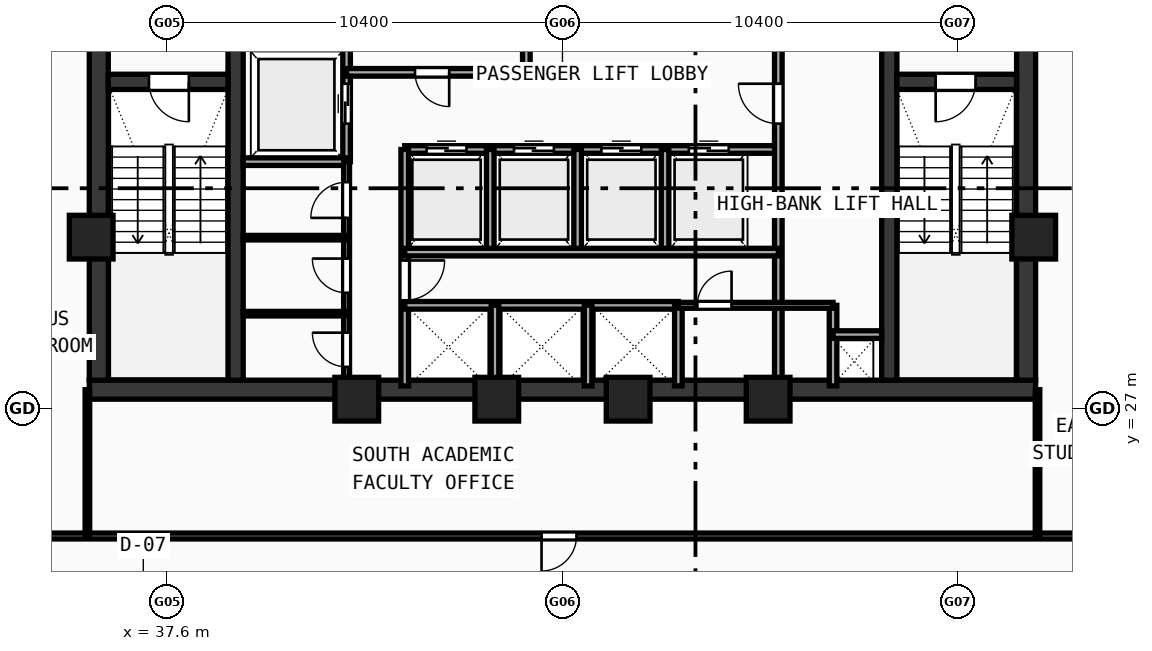
"""IFC4 building model, lengths in metres.
Left out: names, types, materials, properties, quantities, classifications, styles, units other than length and angle.
Written with IfcOpenShell. Run it as: python <this file> out.ifc"""

import sys

from ifc_helpers import new_model, si_unit, direction, frame, frame_2d, origin, origin_with_axes, origin_2d, place, context, subcontext, project, spatial, rectangle, hollow_rectangle, extrude, source, transform, mapped, element, fill, save


model = new_model("IFC4")
c1 = context("Model", 3, precision=1e-05, world=origin(), true_north=direction((0.0, 1.0)))
c2 = subcontext(c1, "Body", "Model", "MODEL_VIEW")
j1 = project(units=[si_unit("LENGTHUNIT", "METRE"), si_unit("PLANEANGLEUNIT", "RADIAN")], contexts=[c1])
p1 = place(None, origin())
s1 = spatial("IfcSite", under=j1, at=p1, CompositionType="ELEMENT")
p2 = place(p1, origin())
s2 = spatial("IfcBuilding", under=s1, at=p2, CompositionType="ELEMENT")
p3 = place(p2, frame((0.0, 0.0, 196.16)))
s3 = spatial("IfcBuildingStorey", under=s2, at=p3, CompositionType="ELEMENT", Elevation=196.16)
p4 = place(p3, frame((35.55, 27.5, 0.0), z_axis=(0.0, 0.0, 1.0), x_axis=(1.0, 0.0, 0.0)))
e1 = element("IfcWall", 1, at=p4, inside=s3, PredefinedType="SHEAR", context=c2, shape_type="SweptSolid", body=[
    extrude(rectangle(XDim=24.9, YDim=0.5, at=frame_2d((12.45, 0.0))), origin(), (0.0, 0.0, 1.0), 3.54),
])
for number, where, z_axis, x_axis in (
    (2, (35.8, 27.75, 0.0), (0.0, 0.0, 1.0), (0.0, 1.0, 0.0)),
    (3, (60.2, 27.75, 0.0), (0.0, 0.0, 1.0), (0.0, 1.0, 0.0)),
):
    element("IfcWall", number, at=place(p3, frame(where, z_axis=z_axis, x_axis=x_axis)), inside=s3, PredefinedType="SHEAR", context=c2, shape_type="SweptSolid", body=[
        extrude(rectangle(XDim=12.2, YDim=0.5, at=frame_2d((6.1, 0.0))), origin(), (0.0, 0.0, 1.0), 3.54),
    ])
p5 = place(p3, frame((39.4, 27.75, 0.0), z_axis=(0.0, 0.0, 1.0), x_axis=(0.0, 1.0, 0.0)))
e4 = element("IfcWall", 4, at=p5, inside=s3, PredefinedType="SHEAR", context=c2, shape_type="SweptSolid", body=[
    extrude(rectangle(XDim=12.2, YDim=0.4, at=frame_2d((6.1, 0.0))), origin(), (0.0, 0.0, 1.0), 3.54),
])
p6 = place(p5, frame((10.0, 0.0, 0.0)))
e5 = element("IfcOpeningElement", 5, at=p6, cuts=e4, PredefinedType="OPENING", context=c2, shape_type="SweptSolid", body=[
    extrude(rectangle(XDim=1.1, YDim=2.1, at=frame_2d((0.55, 1.05))), frame((0.0, 0.21, 0.0), z_axis=(0.0, -1.0, 0.0), x_axis=(1.0, 0.0, 0.0)), (0.0, 0.0, 1.0), 0.42),
])
p7 = place(p3, frame((56.6, 27.75, 0.0), z_axis=(0.0, 0.0, 1.0), x_axis=(0.0, 1.0, 0.0)))
e6 = element("IfcWall", 6, at=p7, inside=s3, PredefinedType="SHEAR", context=c2, shape_type="SweptSolid", body=[
    extrude(rectangle(XDim=12.2, YDim=0.4, at=frame_2d((6.1, 0.0))), origin(), (0.0, 0.0, 1.0), 3.54),
])
p8 = place(p7, frame((10.0, 0.0, 0.0)))
e7 = element("IfcOpeningElement", 7, at=p8, cuts=e6, PredefinedType="OPENING", context=c2, shape_type="SweptSolid", body=[
    extrude(rectangle(XDim=1.1, YDim=2.1, at=frame_2d((0.55, 1.05))), frame((0.0, 0.21, 0.0), z_axis=(0.0, -1.0, 0.0), x_axis=(1.0, 0.0, 0.0)), (0.0, 0.0, 1.0), 0.42),
])
p9 = place(p3, frame((36.05, 35.6, 0.0), z_axis=(0.0, 0.0, 1.0), x_axis=(1.0, 0.0, 0.0)))
e8 = element("IfcWall", 8, at=p9, inside=s3, PredefinedType="SHEAR", context=c2, shape_type="SweptSolid", body=[
    extrude(rectangle(XDim=3.15, YDim=0.4, at=frame_2d((1.575, 0.0))), origin(), (0.0, 0.0, 1.0), 3.54),
])
p10 = place(p9, frame((1.07, 0.0, 0.0)))
e9 = element("IfcOpeningElement", 9, at=p10, cuts=e8, PredefinedType="OPENING", context=c2, shape_type="SweptSolid", body=[
    extrude(rectangle(XDim=1.05, YDim=2.1, at=frame_2d((0.525, 1.05))), frame((0.0, 0.21, 0.0), z_axis=(0.0, -1.0, 0.0), x_axis=(1.0, 0.0, 0.0)), (0.0, 0.0, 1.0), 0.42),
])
p11 = place(p3, frame((56.8, 35.6, 0.0), z_axis=(0.0, 0.0, 1.0), x_axis=(1.0, 0.0, 0.0)))
e10 = element("IfcWall", 10, at=p11, inside=s3, PredefinedType="SHEAR", context=c2, shape_type="SweptSolid", body=[
    extrude(rectangle(XDim=3.15, YDim=0.4, at=frame_2d((1.575, 0.0))), origin(), (0.0, 0.0, 1.0), 3.54),
])
p12 = place(p11, frame((1.02, 0.0, 0.0)))
e11 = element("IfcOpeningElement", 11, at=p12, cuts=e10, PredefinedType="OPENING", context=c2, shape_type="SweptSolid", body=[
    extrude(rectangle(XDim=1.05, YDim=2.1, at=frame_2d((0.525, 1.05))), frame((0.0, 0.21, 0.0), z_axis=(0.0, -1.0, 0.0), x_axis=(1.0, 0.0, 0.0)), (0.0, 0.0, 1.0), 0.42),
])
m1 = source(origin(), c2, "Body", "SweptSolid", [
    extrude(hollow_rectangle(XDim=1.15, YDim=1.15, WallThickness=0.048, at=origin_2d()), origin(), (0.0, 0.0, 1.0), 3.8),
])
for number, where, z_axis, x_axis in (
    (12, (42.588, 27.25, -0.26), (0.0, 0.0, 1.0), (1.0, 0.0, 0.0)),
    (13, (46.272, 27.25, -0.26), (0.0, 0.0, 1.0), (1.0, 0.0, 0.0)),
    (14, (49.729, 27.25, -0.26), (0.0, 0.0, 1.0), (1.0, 0.0, 0.0)),
    (15, (53.412, 27.25, -0.26), (0.0, 0.0, 1.0), (1.0, 0.0, 0.0)),
    (16, (60.4, 31.513, -0.26), (0.0, 0.0, 1.0), (1.0, 0.0, 0.0)),
    (17, (35.6, 31.513, -0.26), (0.0, 0.0, 1.0), (1.0, 0.0, 0.0)),
):
    element("IfcColumn", number, at=place(p3, frame(where, z_axis=z_axis, x_axis=x_axis)), inside=s3, PredefinedType="COLUMN", context=c2, shape_type="MappedRepresentation", body=[
        mapped(m1, transform((0.0, 0.0, 0.0), scale=1.0)),
    ])
p13 = place(p3, frame((42.32, 33.5, 0.0), z_axis=(0.0, 0.0, 1.0), x_axis=(0.0, 1.0, 0.0)))
e18 = element("IfcWall", 18, at=p13, inside=s3, PredefinedType="SOLIDWALL", context=c2, shape_type="SweptSolid", body=[
    extrude(rectangle(XDim=6.45, YDim=0.2, at=frame_2d((3.225, 0.0))), origin(), (0.0, 0.0, 1.0), 3.54),
])
p14 = place(p13, frame((1.0, 0.0, 0.0)))
e19 = element("IfcOpeningElement", 19, at=p14, cuts=e18, PredefinedType="OPENING", context=c2, shape_type="SweptSolid", body=[
    extrude(rectangle(XDim=1.05, YDim=2.1, at=frame_2d((0.525, 1.05))), frame((0.0, 0.11, 0.0), z_axis=(0.0, -1.0, 0.0), x_axis=(1.0, 0.0, 0.0)), (0.0, 0.0, 1.0), 0.22),
])
p15 = place(p3, frame((39.6, 33.5, 0.0), z_axis=(0.0, 0.0, 1.0), x_axis=(1.0, 0.0, 0.0)))
e20 = element("IfcWall", 20, at=p15, inside=s3, PredefinedType="SOLIDWALL", context=c2, shape_type="SweptSolid", body=[
    extrude(rectangle(XDim=2.72, YDim=0.2, at=frame_2d((1.36, 0.0))), origin(), (0.0, 0.0, 1.0), 3.54),
])
p16 = place(p3, frame((42.32, 35.85, 0.0), z_axis=(0.0, 0.0, 1.0), x_axis=(1.0, 0.0, 0.0)))
e21 = element("IfcWall", 21, at=p16, inside=s3, PredefinedType="SOLIDWALL", context=c2, shape_type="SweptSolid", body=[
    extrude(rectangle(XDim=4.73, YDim=0.2, at=frame_2d((2.365, 0.0))), origin(), (0.0, 0.0, 1.0), 3.54),
])
p17 = place(p16, frame((1.8, 0.0, 0.0)))
e22 = element("IfcOpeningElement", 22, at=p17, cuts=e21, PredefinedType="OPENING", context=c2, shape_type="SweptSolid", body=[
    extrude(rectangle(XDim=0.9, YDim=2.1, at=frame_2d((0.45, 1.05))), frame((0.0, 0.11, 0.0), z_axis=(0.0, -1.0, 0.0), x_axis=(1.0, 0.0, 0.0)), (0.0, 0.0, 1.0), 0.22),
])
p18 = place(p3, frame((47.05, 35.85, 0.0), z_axis=(0.0, 0.0, 1.0), x_axis=(0.0, 1.0, 0.0)))
e23 = element("IfcWall", 23, at=p18, inside=s3, PredefinedType="SOLIDWALL", context=c2, shape_type="SweptSolid", body=[
    extrude(rectangle(XDim=4.1, YDim=0.2, at=frame_2d((2.05, 0.0))), origin(), (0.0, 0.0, 1.0), 3.54),
])
p19 = place(p3, frame((43.85, 33.82, 0.0), z_axis=(0.0, 0.0, 1.0), x_axis=(1.0, 0.0, 0.0)))
e24 = element("IfcWall", 24, at=p19, inside=s3, PredefinedType="SOLIDWALL", context=c2, shape_type="SweptSolid", body=[
    extrude(rectangle(XDim=9.83, YDim=0.2, at=frame_2d((4.915, 0.0))), origin(), (0.0, 0.0, 1.0), 3.54),
])
p20 = place(p19, frame((0.575, 0.0, 0.0)))
e25 = element("IfcOpeningElement", 25, at=p20, cuts=e24, PredefinedType="OPENING", context=c2, shape_type="SweptSolid", body=[
    extrude(rectangle(XDim=1.05, YDim=2.1, at=frame_2d((0.525, 1.05))), frame((0.0, 0.11, 0.0), z_axis=(0.0, -1.0, 0.0), x_axis=(1.0, 0.0, 0.0)), (0.0, 0.0, 1.0), 0.22),
])
p21 = place(p19, frame((2.875, 0.0, 0.0)))
e26 = element("IfcOpeningElement", 26, at=p21, cuts=e24, PredefinedType="OPENING", context=c2, shape_type="SweptSolid", body=[
    extrude(rectangle(XDim=1.05, YDim=2.1, at=frame_2d((0.525, 1.05))), frame((0.0, 0.11, 0.0), z_axis=(0.0, -1.0, 0.0), x_axis=(1.0, 0.0, 0.0)), (0.0, 0.0, 1.0), 0.22),
])
p22 = place(p19, frame((5.175, 0.0, 0.0)))
e27 = element("IfcOpeningElement", 27, at=p22, cuts=e24, PredefinedType="OPENING", context=c2, shape_type="SweptSolid", body=[
    extrude(rectangle(XDim=1.05, YDim=2.1, at=frame_2d((0.525, 1.05))), frame((0.0, 0.11, 0.0), z_axis=(0.0, -1.0, 0.0), x_axis=(1.0, 0.0, 0.0)), (0.0, 0.0, 1.0), 0.22),
])
p23 = place(p19, frame((7.475, 0.0, 0.0)))
e28 = element("IfcOpeningElement", 28, at=p23, cuts=e24, PredefinedType="OPENING", context=c2, shape_type="SweptSolid", body=[
    extrude(rectangle(XDim=1.05, YDim=2.1, at=frame_2d((0.525, 1.05))), frame((0.0, 0.11, 0.0), z_axis=(0.0, -1.0, 0.0), x_axis=(1.0, 0.0, 0.0)), (0.0, 0.0, 1.0), 0.22),
])
p24 = place(p3, frame((43.85, 27.6, 0.0), z_axis=(0.0, 0.0, 1.0), x_axis=(0.0, 1.0, 0.0)))
e29 = element("IfcWall", 29, at=p24, inside=s3, PredefinedType="SOLIDWALL", context=c2, shape_type="SweptSolid", body=[
    extrude(rectangle(XDim=6.22, YDim=0.2, at=frame_2d((3.11, 0.0))), origin(), (0.0, 0.0, 1.0), 3.54),
])
p25 = place(p24, frame((2.25, 0.0, 0.0)))
e30 = element("IfcOpeningElement", 30, at=p25, cuts=e29, PredefinedType="OPENING", context=c2, shape_type="SweptSolid", body=[
    extrude(rectangle(XDim=1.05, YDim=2.1, at=frame_2d((0.525, 1.05))), frame((0.0, 0.11, 0.0), z_axis=(0.0, -1.0, 0.0), x_axis=(1.0, 0.0, 0.0)), (0.0, 0.0, 1.0), 0.22),
])
p26 = place(p3, frame((53.68, 27.6, 0.0), z_axis=(0.0, 0.0, 1.0), x_axis=(0.0, 1.0, 0.0)))
e31 = element("IfcWall", 31, at=p26, inside=s3, PredefinedType="SOLIDWALL", context=c2, shape_type="SweptSolid", body=[
    extrude(rectangle(XDim=9.05, YDim=0.2, at=frame_2d((4.525, 0.0))), origin(), (0.0, 0.0, 1.0), 3.54),
])
p27 = place(p26, frame((6.9, 0.0, 0.0)))
e32 = element("IfcOpeningElement", 32, at=p27, cuts=e31, PredefinedType="OPENING", context=c2, shape_type="SweptSolid", body=[
    extrude(rectangle(XDim=1.05, YDim=2.1, at=frame_2d((0.525, 1.05))), frame((0.0, 0.11, 0.0), z_axis=(0.0, -1.0, 0.0), x_axis=(1.0, 0.0, 0.0)), (0.0, 0.0, 1.0), 0.22),
])
for number, where, z_axis, x_axis in (
    (33, (46.1, 31.12, 0.0), (0.0, 0.0, 1.0), (0.0, 1.0, 0.0)),
    (34, (48.4, 31.12, 0.0), (0.0, 0.0, 1.0), (0.0, 1.0, 0.0)),
    (35, (50.7, 31.12, 0.0), (0.0, 0.0, 1.0), (0.0, 1.0, 0.0)),
):
    element("IfcWall", number, at=place(p3, frame(where, z_axis=z_axis, x_axis=x_axis)), inside=s3, PredefinedType="SOLIDWALL", context=c2, shape_type="SweptSolid", body=[
        extrude(rectangle(XDim=2.7, YDim=0.2, at=frame_2d((1.35, 0.0))), origin(), (0.0, 0.0, 1.0), 3.54),
    ])
p28 = place(p3, frame((43.85, 29.72, 0.0), z_axis=(0.0, 0.0, 1.0), x_axis=(1.0, 0.0, 0.0)))
e36 = element("IfcWall", 36, at=p28, inside=s3, PredefinedType="SOLIDWALL", context=c2, shape_type="SweptSolid", body=[
    extrude(rectangle(XDim=7.2, YDim=0.2, at=frame_2d((3.6, 0.0))), origin(), (0.0, 0.0, 1.0), 3.54),
])
p29 = place(p3, frame((51.05, 27.6, 0.0), z_axis=(0.0, 0.0, 1.0), x_axis=(0.0, 1.0, 0.0)))
e37 = element("IfcWall", 37, at=p29, inside=s3, PredefinedType="SOLIDWALL", context=c2, shape_type="SweptSolid", body=[
    extrude(rectangle(XDim=2.12, YDim=0.2, at=frame_2d((1.06, 0.0))), origin(), (0.0, 0.0, 1.0), 3.54),
])
p30 = place(p3, frame((43.85, 31.12, 0.0), z_axis=(0.0, 0.0, 1.0), x_axis=(1.0, 0.0, 0.0)))
e38 = element("IfcWall", 38, at=p30, inside=s3, PredefinedType="SOLIDWALL", context=c2, shape_type="SweptSolid", body=[
    extrude(rectangle(XDim=9.83, YDim=0.2, at=frame_2d((4.915, 0.0))), origin(), (0.0, 0.0, 1.0), 3.54),
])
for number, where, z_axis, x_axis in (
    (39, (46.225, 27.6, 0.0), (0.0, 0.0, 1.0), (0.0, 1.0, 0.0)),
    (40, (48.675, 27.6, 0.0), (0.0, 0.0, 1.0), (0.0, 1.0, 0.0)),
    (41, (55.12, 27.6, 0.0), (0.0, 0.0, 1.0), (0.0, 1.0, 0.0)),
):
    element("IfcWall", number, at=place(p3, frame(where, z_axis=z_axis, x_axis=x_axis)), inside=s3, PredefinedType="SOLIDWALL", context=c2, shape_type="SweptSolid", body=[
        extrude(rectangle(XDim=2.12, YDim=0.2, at=frame_2d((1.06, 0.0))), origin(), (0.0, 0.0, 1.0), 3.54),
    ])
p31 = place(p3, frame((55.12, 28.95, 0.0), z_axis=(0.0, 0.0, 1.0), x_axis=(1.0, 0.0, 0.0)))
e42 = element("IfcWall", 42, at=p31, inside=s3, PredefinedType="SOLIDWALL", context=c2, shape_type="SweptSolid", body=[
    extrude(rectangle(XDim=1.28, YDim=0.2, at=frame_2d((0.64, 0.0))), origin(), (0.0, 0.0, 1.0), 3.54),
])
p32 = place(p3, frame((42.32, 27.6, 0.0), z_axis=(0.0, 0.0, 1.0), x_axis=(0.0, 1.0, 0.0)))
e43 = element("IfcWall", 43, at=p32, inside=s3, PredefinedType="PARTITIONING", context=c2, shape_type="SweptSolid", body=[
    extrude(rectangle(XDim=5.9, YDim=0.155, at=frame_2d((2.95, 0.0))), origin(), (0.0, 0.0, 1.0), 3.54),
])
p33 = place(p32, frame((0.5, 0.0, 0.0)))
e44 = element("IfcOpeningElement", 44, at=p33, cuts=e43, PredefinedType="OPENING", context=c2, shape_type="SweptSolid", body=[
    extrude(rectangle(XDim=0.9, YDim=2.1, at=frame_2d((0.45, 1.05))), frame((0.0, 0.087, 0.0), z_axis=(0.0, -1.0, 0.0), x_axis=(1.0, 0.0, 0.0)), (0.0, 0.0, 1.0), 0.175),
])
p34 = place(p32, frame((2.45, 0.0, 0.0)))
e45 = element("IfcOpeningElement", 45, at=p34, cuts=e43, PredefinedType="OPENING", context=c2, shape_type="SweptSolid", body=[
    extrude(rectangle(XDim=0.9, YDim=2.1, at=frame_2d((0.45, 1.05))), frame((0.0, 0.087, 0.0), z_axis=(0.0, -1.0, 0.0), x_axis=(1.0, 0.0, 0.0)), (0.0, 0.0, 1.0), 0.175),
])
p35 = place(p32, frame((4.42, 0.0, 0.0)))
e46 = element("IfcOpeningElement", 46, at=p35, cuts=e43, PredefinedType="OPENING", context=c2, shape_type="SweptSolid", body=[
    extrude(rectangle(XDim=0.94, YDim=2.1, at=frame_2d((0.47, 1.05))), frame((0.0, 0.087, 0.0), z_axis=(0.0, -1.0, 0.0), x_axis=(1.0, 0.0, 0.0)), (0.0, 0.0, 1.0), 0.175),
])
p36 = place(p3, frame((51.05, 29.72, 0.0), z_axis=(0.0, 0.0, 1.0), x_axis=(1.0, 0.0, 0.0)))
e47 = element("IfcWall", 47, at=p36, inside=s3, PredefinedType="PARTITIONING", context=c2, shape_type="SweptSolid", body=[
    extrude(rectangle(XDim=4.07, YDim=0.155, at=frame_2d((2.035, 0.0))), origin(), (0.0, 0.0, 1.0), 3.54),
])
p37 = place(p36, frame((0.5, 0.0, 0.0)))
e48 = element("IfcOpeningElement", 48, at=p37, cuts=e47, PredefinedType="OPENING", context=c2, shape_type="SweptSolid", body=[
    extrude(rectangle(XDim=0.9, YDim=2.1, at=frame_2d((0.45, 1.05))), frame((0.0, 0.087, 0.0), z_axis=(0.0, -1.0, 0.0), x_axis=(1.0, 0.0, 0.0)), (0.0, 0.0, 1.0), 0.175),
])
for number, where, z_axis, x_axis in (
    (49, (39.6, 29.5, 0.0), (0.0, 0.0, 1.0), (1.0, 0.0, 0.0)),
    (50, (39.6, 31.5, 0.0), (0.0, 0.0, 1.0), (1.0, 0.0, 0.0)),
):
    element("IfcWall", number, at=place(p3, frame(where, z_axis=z_axis, x_axis=x_axis)), inside=s3, PredefinedType="PARTITIONING", context=c2, shape_type="SweptSolid", body=[
        extrude(rectangle(XDim=2.72, YDim=0.12, at=frame_2d((1.36, 0.0))), origin(), (0.0, 0.0, 1.0), 3.54),
    ])
p38 = place(p3, frame((31.45, 23.65, 0.0), z_axis=(0.0, 0.0, 1.0), x_axis=(1.0, 0.0, 0.0)))
e51 = element("IfcWall", 51, at=p38, inside=s3, PredefinedType="PARTITIONING", context=c2, shape_type="SweptSolid", body=[
    extrude(rectangle(XDim=33.1, YDim=0.155, at=frame_2d((16.55, 0.0))), origin(), (0.0, 0.0, 1.0), 2.89),
])
p39 = place(p38, frame((16.0, 0.0, 0.0)))
e52 = element("IfcOpeningElement", 52, at=p39, cuts=e51, PredefinedType="OPENING", context=c2, shape_type="SweptSolid", body=[
    extrude(rectangle(XDim=0.92, YDim=2.1, at=frame_2d((0.46, 1.05))), frame((0.0, 0.087, 0.0), z_axis=(0.0, -1.0, 0.0), x_axis=(1.0, 0.0, 0.0)), (0.0, 0.0, 1.0), 0.175),
])
for number, where, z_axis, x_axis in (
    (53, (35.5, 23.65, 0.0), (0.0, 0.0, 1.0), (0.0, 1.0, 0.0)),
    (54, (60.5, 23.65, 0.0), (0.0, 0.0, 1.0), (0.0, 1.0, 0.0)),
):
    element("IfcWall", number, at=place(p3, frame(where, z_axis=z_axis, x_axis=x_axis)), inside=s3, PredefinedType="PARTITIONING", context=c2, shape_type="SweptSolid", body=[
        extrude(rectangle(XDim=3.85, YDim=0.12, at=frame_2d((1.925, 0.0))), origin(), (0.0, 0.0, 1.0), 3.14),
    ])
m2 = source(origin(), c2, "Body", "SweptSolid", [
    extrude(rectangle(XDim=1.05, YDim=2.1, at=frame_2d((0.525, 1.05))), frame((0.0, 0.025, 0.0), z_axis=(0.0, -1.0, 0.0), x_axis=(1.0, 0.0, 0.0)), (0.0, 0.0, 1.0), 0.05),
])
p40 = place(p10, frame((1.05, 0.0, 0.0), z_axis=(0.0, 0.0, 1.0), x_axis=(-1.0, 0.0, 0.0)))
e55 = element("IfcDoor", 55, at=p40, inside=s3, OperationType="SINGLE_SWING_LEFT", PredefinedType="DOOR", context=c2, shape_type="MappedRepresentation", body=[
    mapped(m2, transform((0.0, 0.0, 0.0), scale=1.0)),
])
fill(e9, e55)
p41 = place(p12, frame((1.05, 0.0, 0.0), z_axis=(0.0, 0.0, 1.0), x_axis=(-1.0, 0.0, 0.0)))
e56 = element("IfcDoor", 56, at=p41, inside=s3, OperationType="SINGLE_SWING_RIGHT", PredefinedType="DOOR", context=c2, shape_type="MappedRepresentation", body=[
    mapped(m2, transform((0.0, 0.0, 0.0), scale=1.0)),
])
fill(e11, e56)
p42 = place(p14, origin_with_axes())
e57 = element("IfcDoor", 57, at=p42, inside=s3, OperationType="DOUBLE_DOOR_SLIDING", PredefinedType="DOOR", context=c2, shape_type="MappedRepresentation", body=[
    mapped(m2, transform((0.0, 0.0, 0.0), scale=1.0)),
])
fill(e19, e57)
m3 = source(origin(), c2, "Body", "SweptSolid", [
    extrude(rectangle(XDim=0.9, YDim=2.1, at=frame_2d((0.45, 1.05))), frame((0.0, 0.025, 0.0), z_axis=(0.0, -1.0, 0.0), x_axis=(1.0, 0.0, 0.0)), (0.0, 0.0, 1.0), 0.05),
])
p43 = place(p17, frame((0.9, 0.0, 0.0), z_axis=(0.0, 0.0, 1.0), x_axis=(-1.0, 0.0, 0.0)))
e58 = element("IfcDoor", 58, at=p43, inside=s3, OperationType="SINGLE_SWING_LEFT", PredefinedType="DOOR", context=c2, shape_type="MappedRepresentation", body=[
    mapped(m3, transform((0.0, 0.0, 0.0), scale=1.0)),
])
fill(e22, e58)
p44 = place(p20, origin_with_axes())
e59 = element("IfcDoor", 59, at=p44, inside=s3, OperationType="DOUBLE_DOOR_SLIDING", PredefinedType="DOOR", context=c2, shape_type="MappedRepresentation", body=[
    mapped(m2, transform((0.0, 0.0, 0.0), scale=1.0)),
])
fill(e25, e59)
p45 = place(p21, origin_with_axes())
e60 = element("IfcDoor", 60, at=p45, inside=s3, OperationType="DOUBLE_DOOR_SLIDING", PredefinedType="DOOR", context=c2, shape_type="MappedRepresentation", body=[
    mapped(m2, transform((0.0, 0.0, 0.0), scale=1.0)),
])
fill(e26, e60)
p46 = place(p22, origin_with_axes())
e61 = element("IfcDoor", 61, at=p46, inside=s3, OperationType="DOUBLE_DOOR_SLIDING", PredefinedType="DOOR", context=c2, shape_type="MappedRepresentation", body=[
    mapped(m2, transform((0.0, 0.0, 0.0), scale=1.0)),
])
fill(e27, e61)
p47 = place(p23, origin_with_axes())
e62 = element("IfcDoor", 62, at=p47, inside=s3, OperationType="DOUBLE_DOOR_SLIDING", PredefinedType="DOOR", context=c2, shape_type="MappedRepresentation", body=[
    mapped(m2, transform((0.0, 0.0, 0.0), scale=1.0)),
])
fill(e28, e62)
p48 = place(p25, frame((1.05, 0.0, 0.0), z_axis=(0.0, 0.0, 1.0), x_axis=(-1.0, 0.0, 0.0)))
e63 = element("IfcDoor", 63, at=p48, inside=s3, OperationType="SINGLE_SWING_LEFT", PredefinedType="DOOR", context=c2, shape_type="MappedRepresentation", body=[
    mapped(m2, transform((0.0, 0.0, 0.0), scale=1.0)),
])
fill(e30, e63)
p49 = place(p27, origin_with_axes())
e64 = element("IfcDoor", 64, at=p49, inside=s3, OperationType="SINGLE_SWING_RIGHT", PredefinedType="DOOR", context=c2, shape_type="MappedRepresentation", body=[
    mapped(m2, transform((0.0, 0.0, 0.0), scale=1.0)),
])
fill(e32, e64)
p50 = place(p33, origin_with_axes())
e65 = element("IfcDoor", 65, at=p50, inside=s3, OperationType="SINGLE_SWING_RIGHT", PredefinedType="DOOR", context=c2, shape_type="MappedRepresentation", body=[
    mapped(m3, transform((0.0, 0.0, 0.0), scale=1.0)),
])
fill(e44, e65)
p51 = place(p34, origin_with_axes())
e66 = element("IfcDoor", 66, at=p51, inside=s3, OperationType="SINGLE_SWING_RIGHT", PredefinedType="DOOR", context=c2, shape_type="MappedRepresentation", body=[
    mapped(m3, transform((0.0, 0.0, 0.0), scale=1.0)),
])
fill(e45, e66)
m4 = source(origin(), c2, "Body", "SweptSolid", [
    extrude(rectangle(XDim=0.94, YDim=2.1, at=frame_2d((0.47, 1.05))), frame((0.0, 0.025, 0.0), z_axis=(0.0, -1.0, 0.0), x_axis=(1.0, 0.0, 0.0)), (0.0, 0.0, 1.0), 0.05),
])
p52 = place(p35, origin_with_axes())
e67 = element("IfcDoor", 67, at=p52, inside=s3, OperationType="SINGLE_SWING_LEFT", PredefinedType="DOOR", context=c2, shape_type="MappedRepresentation", body=[
    mapped(m4, transform((0.0, 0.0, 0.0), scale=1.0)),
])
fill(e46, e67)
p53 = place(p37, origin_with_axes())
e68 = element("IfcDoor", 68, at=p53, inside=s3, OperationType="SINGLE_SWING_RIGHT", PredefinedType="DOOR", context=c2, shape_type="MappedRepresentation", body=[
    mapped(m3, transform((0.0, 0.0, 0.0), scale=1.0)),
])
fill(e48, e68)
m5 = source(origin(), c2, "Body", "SweptSolid", [
    extrude(rectangle(XDim=0.92, YDim=2.1, at=frame_2d((0.46, 1.05))), frame((0.0, 0.025, 0.0), z_axis=(0.0, -1.0, 0.0), x_axis=(1.0, 0.0, 0.0)), (0.0, 0.0, 1.0), 0.05),
])
p54 = place(p39, frame((0.92, 0.0, 0.0), z_axis=(0.0, 0.0, 1.0), x_axis=(-1.0, 0.0, 0.0)))
e69 = element("IfcDoor", 69, at=p54, inside=s3, OperationType="SINGLE_SWING_RIGHT", PredefinedType="DOOR", context=c2, shape_type="MappedRepresentation", body=[
    mapped(m5, transform((0.0, 0.0, 0.0), scale=1.0)),
])
fill(e52, e69)
save(model, sys.argv[1])
